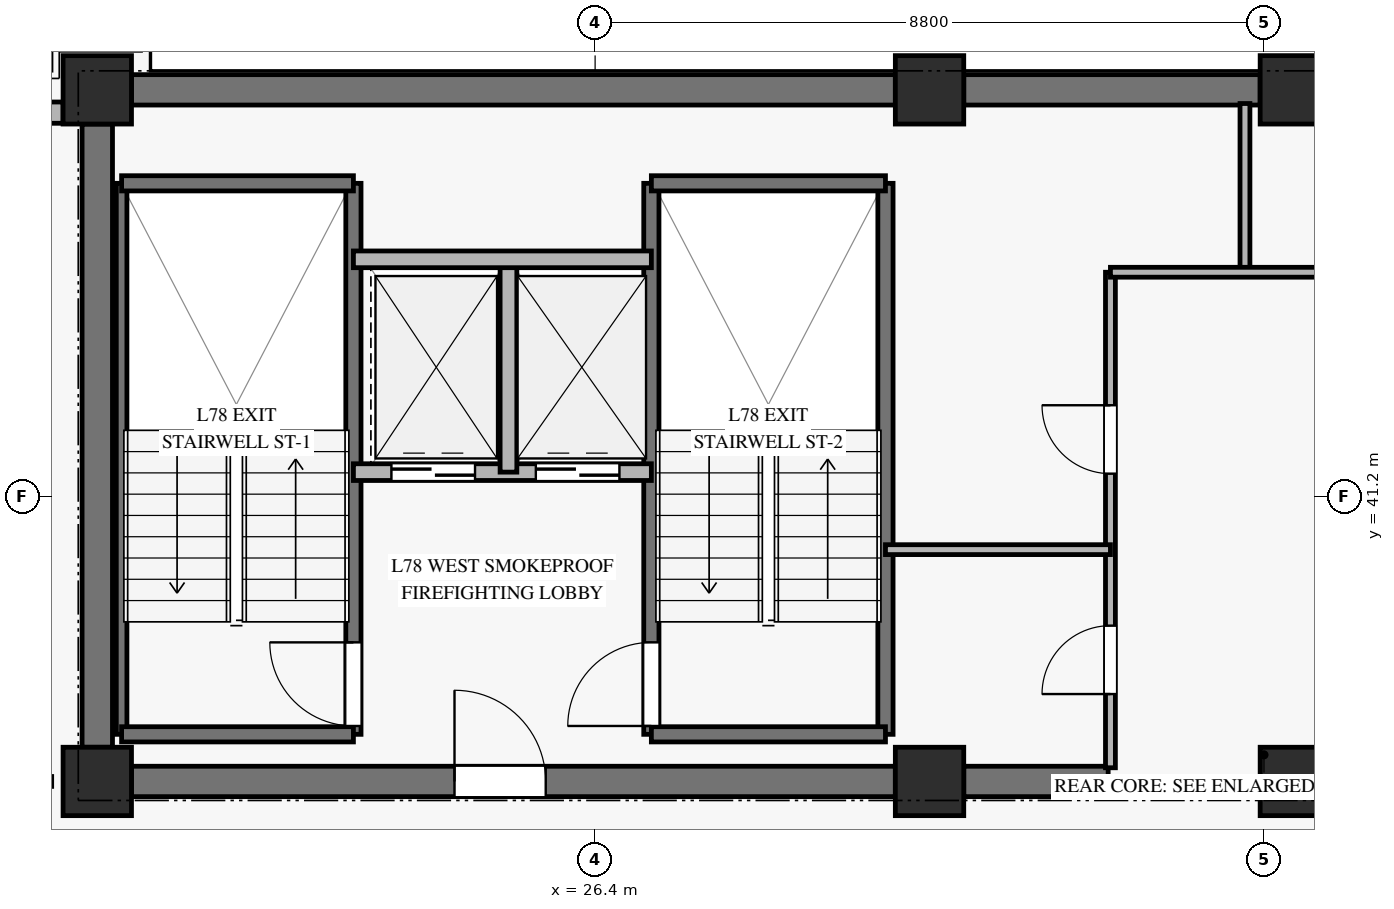
"""IFC4 building model, lengths in metres.
Left out: names, types, materials, properties, quantities, classifications, styles, units other than length and angle.
Written with IfcOpenShell. Run it as: python <this file> out.ifc"""

import sys

from ifc_helpers import new_model, si_unit, direction, frame, frame_2d, origin, origin_2d, place, context, subcontext, project, spatial, rectangle, extrude, source, transform, mapped, element, fill, save


model = new_model("IFC4")
c1 = context("Model", 3, precision=1e-05, world=origin(), true_north=direction((0.0, 1.0)))
c2 = subcontext(c1, "Body", "Model", "MODEL_VIEW")
j1 = project(units=[si_unit("LENGTHUNIT", "METRE"), si_unit("PLANEANGLEUNIT", "RADIAN")], contexts=[c1])
p1 = place(None, origin())
s1 = spatial("IfcSite", under=j1, at=p1, CompositionType="ELEMENT")
p2 = place(p1, origin())
s2 = spatial("IfcBuilding", under=s1, at=p2, CompositionType="ELEMENT")
p3 = place(p2, frame((0.0, 0.0, 304.0)))
s3 = spatial("IfcBuildingStorey", under=s2, at=p3, CompositionType="ELEMENT", Elevation=304.0)
m1 = source(origin(), c2, "Body", "SweptSolid", [
    extrude(rectangle(XDim=0.9, YDim=0.9, at=origin_2d()), origin(), (0.0, 0.0, 1.0), 3.185),
])
for number, where, z_axis, x_axis in (
    (1, (19.85, 37.45, 0.0), (0.0, 0.0, 1.0), (1.0, 0.0, 0.0)),
    (2, (19.85, 46.55, 0.0), (0.0, 0.0, 1.0), (1.0, 0.0, 0.0)),
    (3, (30.8, 37.45, 0.0), (0.0, 0.0, 1.0), (1.0, 0.0, 0.0)),
    (4, (30.8, 46.55, 0.0), (0.0, 0.0, 1.0), (1.0, 0.0, 0.0)),
    (5, (35.6, 37.45, 0.0), (0.0, 0.0, 1.0), (1.0, 0.0, 0.0)),
    (6, (35.6, 46.55, 0.0), (0.0, 0.0, 1.0), (1.0, 0.0, 0.0)),
):
    element("IfcColumn", number, at=place(p3, frame(where, z_axis=z_axis, x_axis=x_axis)), inside=s3, PredefinedType="PILASTER", context=c2, shape_type="MappedRepresentation", body=[
        mapped(m1, transform((0.0, 0.0, 0.0), x_axis=(1.0, 0.0, 0.0), y_axis=(0.0, 1.0, 0.0), z_axis=(0.0, 0.0, 1.0), scale=1.0)),
    ])
p4 = place(p3, frame((20.3, 46.55, 0.0), z_axis=(0.0, 0.0, 1.0), x_axis=(1.0, 0.0, 0.0)))
e7 = element("IfcWall", 7, at=p4, inside=s3, PredefinedType="SHEAR", context=c2, shape_type="SweptSolid", body=[
    extrude(rectangle(XDim=10.05, YDim=0.4, at=frame_2d((5.025, 0.0))), origin(), (0.0, 0.0, 1.0), 3.185),
])
p5 = place(p3, frame((31.25, 46.55, 0.0), z_axis=(0.0, 0.0, 1.0), x_axis=(1.0, 0.0, 0.0)))
e8 = element("IfcWall", 8, at=p5, inside=s3, PredefinedType="SHEAR", context=c2, shape_type="SweptSolid", body=[
    extrude(rectangle(XDim=3.9, YDim=0.4, at=frame_2d((1.95, 0.0))), origin(), (0.0, 0.0, 1.0), 3.185),
])
p6 = place(p3, frame((20.3, 37.45, 0.0), z_axis=(0.0, 0.0, 1.0), x_axis=(1.0, 0.0, 0.0)))
e9 = element("IfcWall", 9, at=p6, inside=s3, PredefinedType="SHEAR", context=c2, shape_type="SweptSolid", body=[
    extrude(rectangle(XDim=10.05, YDim=0.4, at=frame_2d((5.025, 0.0))), origin(), (0.0, 0.0, 1.0), 3.185),
])
p7 = place(p6, frame((4.25, 0.0, 0.0)))
e10 = element("IfcOpeningElement", 10, at=p7, cuts=e9, PredefinedType="OPENING", context=c2, shape_type="SweptSolid", body=[
    extrude(rectangle(XDim=1.2, YDim=2.15, at=frame_2d((0.6, 1.075))), frame((0.0, 0.21, 0.0), z_axis=(0.0, -1.0, 0.0), x_axis=(1.0, 0.0, 0.0)), (0.0, 0.0, 1.0), 0.42),
])
p8 = place(p3, frame((31.25, 37.45, 0.0), z_axis=(0.0, 0.0, 1.0), x_axis=(1.0, 0.0, 0.0)))
e11 = element("IfcWall", 11, at=p8, inside=s3, PredefinedType="SHEAR", context=c2, shape_type="SweptSolid", body=[
    extrude(rectangle(XDim=1.9, YDim=0.4, at=frame_2d((0.95, 0.0))), origin(), (0.0, 0.0, 1.0), 3.185),
])
p9 = place(p3, frame((19.85, 37.9, 0.0), z_axis=(0.0, 0.0, 1.0), x_axis=(0.0, 1.0, 0.0)))
e12 = element("IfcWall", 12, at=p9, inside=s3, PredefinedType="SHEAR", context=c2, shape_type="SweptSolid", body=[
    extrude(rectangle(XDim=8.2, YDim=0.4, at=frame_2d((4.1, 0.0))), origin(), (0.0, 0.0, 1.0), 3.185),
])
p10 = place(p3, frame((13.025, 46.25, 0.0), z_axis=(0.0, 0.0, 1.0), x_axis=(1.0, 0.0, 0.0)))
e13 = element("IfcWall", 13, at=p10, inside=s3, PredefinedType="SOLIDWALL", context=c2, shape_type="SweptSolid", body=[
    extrude(rectangle(XDim=6.375, YDim=0.28, at=frame_2d((3.188, 0.0))), origin(), (0.0, 0.0, 1.0), 2.815),
])
p11 = place(p10, frame((2.387, 0.0, 0.45)))
e14 = element("IfcOpeningElement", 14, at=p11, cuts=e13, PredefinedType="OPENING", context=c2, shape_type="SweptSolid", body=[
    extrude(rectangle(XDim=1.6, YDim=2.0, at=frame_2d((0.8, 1.0))), frame((0.0, 0.15, 0.0), z_axis=(0.0, -1.0, 0.0), x_axis=(1.0, 0.0, 0.0)), (0.0, 0.0, 1.0), 0.3),
])
p12 = place(p3, frame((20.17, 38.07, 0.0), z_axis=(0.0, 0.0, 1.0), x_axis=(0.0, 1.0, 0.0)))
e15 = element("IfcWall", 15, at=p12, inside=s3, PredefinedType="SOLIDWALL", context=c2, shape_type="SweptSolid", body=[
    extrude(rectangle(XDim=7.25, YDim=0.14, at=frame_2d((3.625, 0.0))), origin(), (0.0, 0.0, 1.0), 3.4),
])
p13 = place(p3, frame((23.22, 38.07, 0.0), z_axis=(0.0, 0.0, 1.0), x_axis=(0.0, 1.0, 0.0)))
e16 = element("IfcWall", 16, at=p13, inside=s3, PredefinedType="SOLIDWALL", context=c2, shape_type="SweptSolid", body=[
    extrude(rectangle(XDim=7.25, YDim=0.2, at=frame_2d((3.625, 0.0))), origin(), (0.0, 0.0, 1.0), 3.4),
])
p14 = place(p13, frame((0.11, 0.0, 0.0)))
e17 = element("IfcOpeningElement", 17, at=p14, cuts=e16, PredefinedType="OPENING", context=c2, shape_type="SweptSolid", body=[
    extrude(rectangle(XDim=1.1, YDim=2.15, at=frame_2d((0.55, 1.075))), frame((0.0, 0.11, 0.0), z_axis=(0.0, -1.0, 0.0), x_axis=(1.0, 0.0, 0.0)), (0.0, 0.0, 1.0), 0.22),
])
for number, where, z_axis, x_axis in (
    (18, (20.17, 45.32, 0.0), (0.0, 0.0, 1.0), (1.0, 0.0, 0.0)),
    (19, (20.17, 38.07, 0.0), (0.0, 0.0, 1.0), (1.0, 0.0, 0.0)),
):
    element("IfcWall", number, at=place(p3, frame(where, z_axis=z_axis, x_axis=x_axis)), inside=s3, PredefinedType="SOLIDWALL", context=c2, shape_type="SweptSolid", body=[
        extrude(rectangle(XDim=3.05, YDim=0.2, at=frame_2d((1.525, 0.0))), origin(), (0.0, 0.0, 1.0), 3.4),
    ])
p15 = place(p3, frame((27.14, 38.07, 0.0), z_axis=(0.0, 0.0, 1.0), x_axis=(0.0, 1.0, 0.0)))
e20 = element("IfcWall", 20, at=p15, inside=s3, PredefinedType="SOLIDWALL", context=c2, shape_type="SweptSolid", body=[
    extrude(rectangle(XDim=7.25, YDim=0.2, at=frame_2d((3.625, 0.0))), origin(), (0.0, 0.0, 1.0), 3.4),
])
p16 = place(p15, frame((0.11, 0.0, 0.0)))
e21 = element("IfcOpeningElement", 21, at=p16, cuts=e20, PredefinedType="OPENING", context=c2, shape_type="SweptSolid", body=[
    extrude(rectangle(XDim=1.1, YDim=2.15, at=frame_2d((0.55, 1.075))), frame((0.0, 0.11, 0.0), z_axis=(0.0, -1.0, 0.0), x_axis=(1.0, 0.0, 0.0)), (0.0, 0.0, 1.0), 0.22),
])
p17 = place(p3, frame((30.22, 38.07, 0.0), z_axis=(0.0, 0.0, 1.0), x_axis=(0.0, 1.0, 0.0)))
e22 = element("IfcWall", 22, at=p17, inside=s3, PredefinedType="SOLIDWALL", context=c2, shape_type="SweptSolid", body=[
    extrude(rectangle(XDim=7.25, YDim=0.2, at=frame_2d((3.625, 0.0))), origin(), (0.0, 0.0, 1.0), 3.4),
])
for number, where, z_axis, x_axis in (
    (23, (27.14, 45.32, 0.0), (0.0, 0.0, 1.0), (1.0, 0.0, 0.0)),
    (24, (27.14, 38.07, 0.0), (0.0, 0.0, 1.0), (1.0, 0.0, 0.0)),
):
    element("IfcWall", number, at=place(p3, frame(where, z_axis=z_axis, x_axis=x_axis)), inside=s3, PredefinedType="SOLIDWALL", context=c2, shape_type="SweptSolid", body=[
        extrude(rectangle(XDim=3.08, YDim=0.2, at=frame_2d((1.54, 0.0))), origin(), (0.0, 0.0, 1.0), 3.4),
    ])
p18 = place(p3, frame((23.22, 41.52, 0.0), z_axis=(0.0, 0.0, 1.0), x_axis=(1.0, 0.0, 0.0)))
e25 = element("IfcWall", 25, at=p18, inside=s3, PredefinedType="SOLIDWALL", context=c2, shape_type="SweptSolid", body=[
    extrude(rectangle(XDim=3.92, YDim=0.22, at=frame_2d((1.96, 0.0))), origin(), (0.0, 0.0, 1.0), 3.185),
])
p19 = place(p18, frame((0.5, 0.0, 0.0)))
e26 = element("IfcOpeningElement", 26, at=p19, cuts=e25, PredefinedType="OPENING", context=c2, shape_type="SweptSolid", body=[
    extrude(rectangle(XDim=1.1, YDim=2.2, at=frame_2d((0.55, 1.1))), frame((0.0, 0.12, 0.0), z_axis=(0.0, -1.0, 0.0), x_axis=(1.0, 0.0, 0.0)), (0.0, 0.0, 1.0), 0.24),
])
p20 = place(p18, frame((2.4, 0.0, 0.0)))
e27 = element("IfcOpeningElement", 27, at=p20, cuts=e25, PredefinedType="OPENING", context=c2, shape_type="SweptSolid", body=[
    extrude(rectangle(XDim=1.1, YDim=2.2, at=frame_2d((0.55, 1.1))), frame((0.0, 0.12, 0.0), z_axis=(0.0, -1.0, 0.0), x_axis=(1.0, 0.0, 0.0)), (0.0, 0.0, 1.0), 0.24),
])
p21 = place(p3, frame((25.26, 41.52, 0.0), z_axis=(0.0, 0.0, 1.0), x_axis=(0.0, 1.0, 0.0)))
e28 = element("IfcWall", 28, at=p21, inside=s3, PredefinedType="SOLIDWALL", context=c2, shape_type="SweptSolid", body=[
    extrude(rectangle(XDim=2.8, YDim=0.22, at=frame_2d((1.4, 0.0))), origin(), (0.0, 0.0, 1.0), 3.185),
])
p22 = place(p3, frame((23.22, 44.32, 0.0), z_axis=(0.0, 0.0, 1.0), x_axis=(1.0, 0.0, 0.0)))
e29 = element("IfcWall", 29, at=p22, inside=s3, PredefinedType="SOLIDWALL", context=c2, shape_type="SweptSolid", body=[
    extrude(rectangle(XDim=3.92, YDim=0.22, at=frame_2d((1.96, 0.0))), origin(), (0.0, 0.0, 1.0), 3.185),
])
p23 = place(p3, frame((33.18, 37.63, 0.0), z_axis=(0.0, 0.0, 1.0), x_axis=(0.0, 1.0, 0.0)))
e30 = element("IfcWall", 30, at=p23, inside=s3, PredefinedType="PARTITIONING", context=c2, shape_type="SweptSolid", body=[
    extrude(rectangle(XDim=6.52, YDim=0.13, at=frame_2d((3.26, 0.0))), origin(), (0.0, 0.0, 1.0), 2.27),
])
p24 = place(p23, frame((0.97, 0.0, 0.0)))
e31 = element("IfcOpeningElement", 31, at=p24, cuts=e30, PredefinedType="OPENING", context=c2, shape_type="SweptSolid", body=[
    extrude(rectangle(XDim=0.9, YDim=2.1, at=frame_2d((0.45, 1.05))), frame((0.0, 0.075, 0.0), z_axis=(0.0, -1.0, 0.0), x_axis=(1.0, 0.0, 0.0)), (0.0, 0.0, 1.0), 0.15),
])
p25 = place(p23, frame((3.87, 0.0, 0.0)))
e32 = element("IfcOpeningElement", 32, at=p25, cuts=e30, PredefinedType="OPENING", context=c2, shape_type="SweptSolid", body=[
    extrude(rectangle(XDim=0.9, YDim=2.1, at=frame_2d((0.45, 1.05))), frame((0.0, 0.075, 0.0), z_axis=(0.0, -1.0, 0.0), x_axis=(1.0, 0.0, 0.0)), (0.0, 0.0, 1.0), 0.15),
])
p26 = place(p3, frame((34.95, 44.15, 0.0), z_axis=(0.0, 0.0, 1.0), x_axis=(0.0, 1.0, 0.0)))
e33 = element("IfcWall", 33, at=p26, inside=s3, PredefinedType="PARTITIONING", context=c2, shape_type="SweptSolid", body=[
    extrude(rectangle(XDim=2.22, YDim=0.13, at=frame_2d((1.11, 0.0))), origin(), (0.0, 0.0, 1.0), 3.185),
])
p27 = place(p3, frame((33.18, 44.15, 0.0), z_axis=(0.0, 0.0, 1.0), x_axis=(1.0, 0.0, 0.0)))
e34 = element("IfcWall", 34, at=p27, inside=s3, PredefinedType="PARTITIONING", context=c2, shape_type="SweptSolid", body=[
    extrude(rectangle(XDim=2.94, YDim=0.13, at=frame_2d((1.47, 0.0))), origin(), (0.0, 0.0, 1.0), 2.47),
])
p28 = place(p3, frame((30.22, 40.5, 0.0), z_axis=(0.0, 0.0, 1.0), x_axis=(1.0, 0.0, 0.0)))
e35 = element("IfcWall", 35, at=p28, inside=s3, PredefinedType="PARTITIONING", context=c2, shape_type="SweptSolid", body=[
    extrude(rectangle(XDim=2.96, YDim=0.13, at=frame_2d((1.48, 0.0))), origin(), (0.0, 0.0, 1.0), 2.47),
])
m2 = source(origin(), c2, "Body", "SweptSolid", [
    extrude(rectangle(XDim=1.1, YDim=2.15, at=frame_2d((0.55, 1.075))), frame((0.0, 0.025, 0.0), z_axis=(0.0, -1.0, 0.0), x_axis=(1.0, 0.0, 0.0)), (0.0, 0.0, 1.0), 0.05),
])
p29 = place(p14, origin())
e36 = element("IfcDoor", 36, at=p29, inside=s3, OperationType="SINGLE_SWING_RIGHT", PredefinedType="DOOR", context=c2, shape_type="MappedRepresentation", body=[
    mapped(m2, transform((0.0, 0.0, 0.0), x_axis=(1.0, 0.0, 0.0), y_axis=(0.0, 1.0, 0.0), z_axis=(0.0, 0.0, 1.0), scale=1.0)),
])
fill(e17, e36)
p30 = place(p16, origin())
e37 = element("IfcDoor", 37, at=p30, inside=s3, OperationType="SINGLE_SWING_LEFT", PredefinedType="DOOR", context=c2, shape_type="MappedRepresentation", body=[
    mapped(m2, transform((0.0, 0.0, 0.0), x_axis=(1.0, 0.0, 0.0), y_axis=(0.0, 1.0, 0.0), z_axis=(0.0, 0.0, 1.0), scale=1.0)),
])
fill(e21, e37)
m3 = source(origin(), c2, "Body", "SweptSolid", [
    extrude(rectangle(XDim=1.1, YDim=2.2, at=frame_2d((0.55, 1.1))), frame((0.0, 0.025, 0.0), z_axis=(0.0, -1.0, 0.0), x_axis=(1.0, 0.0, 0.0)), (0.0, 0.0, 1.0), 0.05),
])
p31 = place(p19, origin())
e38 = element("IfcDoor", 38, at=p31, inside=s3, OperationType="SLIDING_TO_LEFT", PredefinedType="DOOR", context=c2, shape_type="MappedRepresentation", body=[
    mapped(m3, transform((0.0, 0.0, 0.0), x_axis=(1.0, 0.0, 0.0), y_axis=(0.0, 1.0, 0.0), z_axis=(0.0, 0.0, 1.0), scale=1.0)),
])
fill(e26, e38)
p32 = place(p20, origin())
e39 = element("IfcDoor", 39, at=p32, inside=s3, OperationType="SLIDING_TO_LEFT", PredefinedType="DOOR", context=c2, shape_type="MappedRepresentation", body=[
    mapped(m3, transform((0.0, 0.0, 0.0), x_axis=(1.0, 0.0, 0.0), y_axis=(0.0, 1.0, 0.0), z_axis=(0.0, 0.0, 1.0), scale=1.0)),
])
fill(e27, e39)
m4 = source(origin(), c2, "Body", "SweptSolid", [
    extrude(rectangle(XDim=1.2, YDim=2.15, at=frame_2d((0.6, 1.075))), frame((0.0, 0.025, 0.0), z_axis=(0.0, -1.0, 0.0), x_axis=(1.0, 0.0, 0.0)), (0.0, 0.0, 1.0), 0.05),
])
p33 = place(p7, origin())
e40 = element("IfcDoor", 40, at=p33, inside=s3, OperationType="SINGLE_SWING_LEFT", PredefinedType="DOOR", context=c2, shape_type="MappedRepresentation", body=[
    mapped(m4, transform((0.0, 0.0, 0.0), x_axis=(1.0, 0.0, 0.0), y_axis=(0.0, 1.0, 0.0), z_axis=(0.0, 0.0, 1.0), scale=1.0)),
])
fill(e10, e40)
m5 = source(origin(), c2, "Body", "SweptSolid", [
    extrude(rectangle(XDim=0.9, YDim=2.1, at=frame_2d((0.45, 1.05))), frame((0.0, 0.025, 0.0), z_axis=(0.0, -1.0, 0.0), x_axis=(1.0, 0.0, 0.0)), (0.0, 0.0, 1.0), 0.05),
])
p34 = place(p24, origin())
e41 = element("IfcDoor", 41, at=p34, inside=s3, OperationType="SINGLE_SWING_LEFT", PredefinedType="DOOR", context=c2, shape_type="MappedRepresentation", body=[
    mapped(m5, transform((0.0, 0.0, 0.0), x_axis=(1.0, 0.0, 0.0), y_axis=(0.0, 1.0, 0.0), z_axis=(0.0, 0.0, 1.0), scale=1.0)),
])
fill(e31, e41)
p35 = place(p25, origin())
e42 = element("IfcDoor", 42, at=p35, inside=s3, OperationType="SINGLE_SWING_RIGHT", PredefinedType="DOOR", context=c2, shape_type="MappedRepresentation", body=[
    mapped(m5, transform((0.0, 0.0, 0.0), x_axis=(1.0, 0.0, 0.0), y_axis=(0.0, 1.0, 0.0), z_axis=(0.0, 0.0, 1.0), scale=1.0)),
])
fill(e32, e42)
save(model, sys.argv[1])
